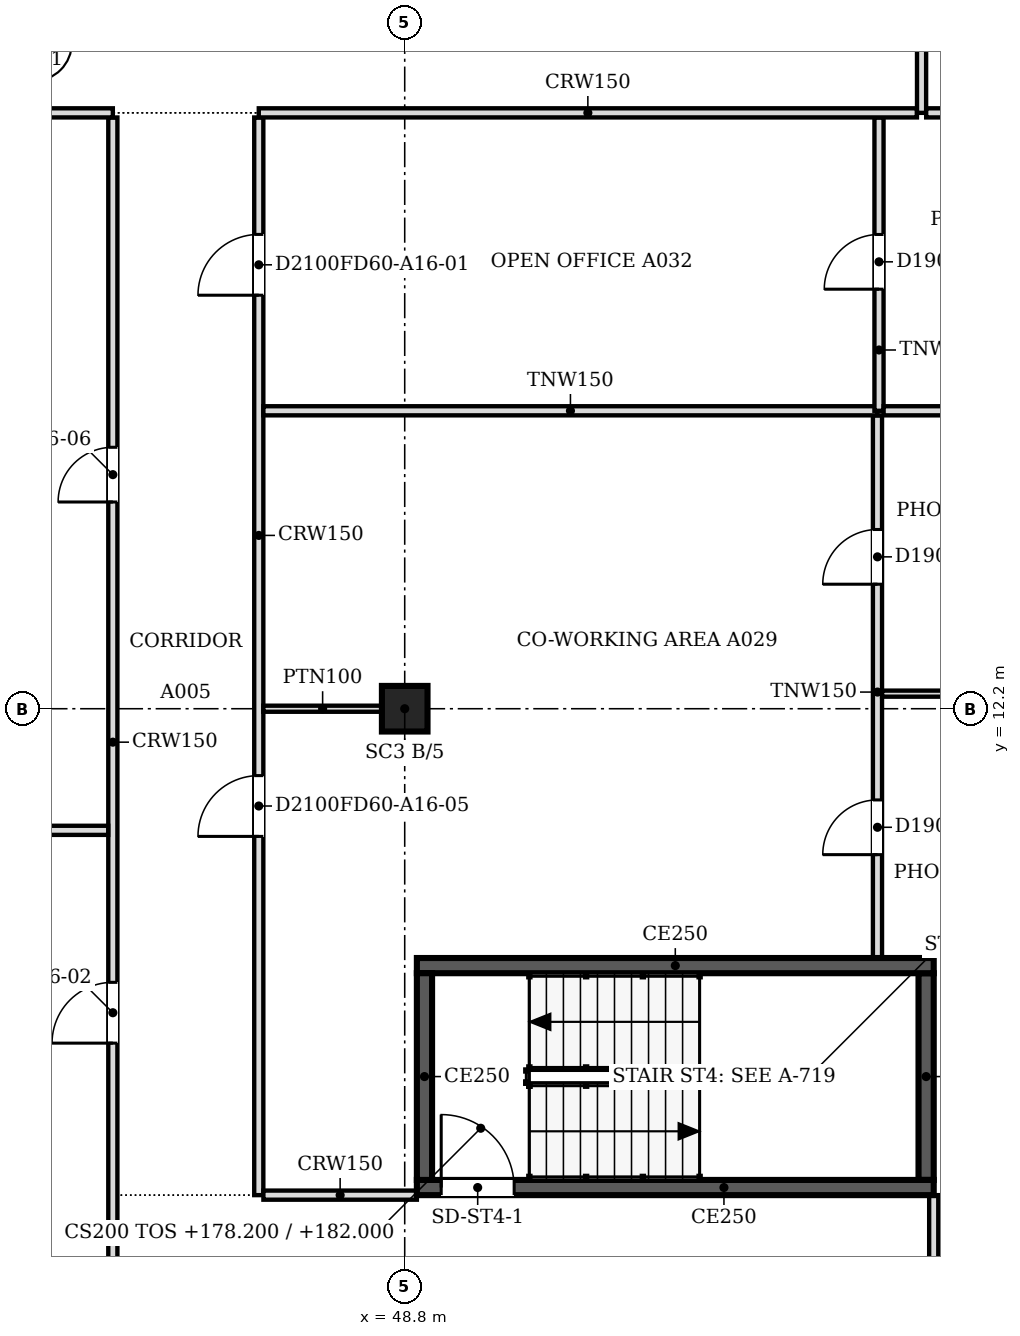
"""IFC4 building model, lengths in metres.
Left out: names, types, materials, properties, quantities, classifications, styles, units other than length and angle.
Written with IfcOpenShell. Run it as: python <this file> out.ifc"""

import sys

from ifc_helpers import new_model, si_unit, direction, frame, frame_2d, origin, origin_2d, place, context, subcontext, project, spatial, polyline, rectangle, outline, extrude, faceted_brep, source, transform, mapped, element, fill, save


model = new_model("IFC4")
c1 = context("Model", 3, precision=1e-05, world=origin(), true_north=direction((0.0, 1.0)))
c2 = subcontext(c1, "Body", "Model", "MODEL_VIEW")
j1 = project(units=[si_unit("LENGTHUNIT", "METRE"), si_unit("PLANEANGLEUNIT", "RADIAN")], contexts=[c1])
p1 = place(None, origin())
s1 = spatial("IfcSite", under=j1, at=p1, CompositionType="ELEMENT")
p2 = place(p1, origin())
s2 = spatial("IfcBuilding", under=s1, at=p2, CompositionType="ELEMENT")
p3 = place(p2, frame((0.0, 0.0, 178.2)))
s3 = spatial("IfcBuildingStorey", under=s2, at=p3, CompositionType="ELEMENT", Elevation=178.2)
p4 = place(p3, frame((48.8, 12.2, 0.0), z_axis=(0.0, 0.0, 1.0), x_axis=(1.0, 0.0, 0.0)))
e1 = element("IfcColumn", 1, at=p4, inside=s3, PredefinedType="COLUMN", context=c2, shape_type="SweptSolid", body=[
    extrude(rectangle(XDim=0.75, YDim=0.75, at=origin_2d()), origin(), (0.0, 0.0, 1.0), 3.6),
])
m1 = source(origin(), c2, "Body", "Brep", [
    faceted_brep([(2.944, -0.25, 0.0), (2.997, -0.25, 0.068), (2.997, -0.25, 7.532), (2.944, -0.25, 7.6), (0.0, -0.25, 3.8), (0.053, 0.25, 3.868), (2.891, 0.25, 7.532), (2.891, 0.25, 0.068), (0.053, 0.25, 3.732), (2.944, 0.0, 0.0), (2.944, 0.0, 7.6), (0.0, 0.0, 3.8)], [[[0, 1, 2, 3, 4]], [[5, 6, 7, 8]], [[1, 0, 9]], [[10, 3, 2]], [[6, 5, 11, 4, 3, 10]], [[8, 7, 9, 0, 4, 11]], [[8, 11, 5]], [[1, 9, 7, 6, 10, 2]]]),
])
p5 = place(p3, frame((57.606, 1.312, -3.8), z_axis=(0.0, 0.0, 1.0), x_axis=(0.707147509625, 0.707066050402, 0.0)))
e2 = element("IfcWall", 2, at=p5, inside=s3, PredefinedType="SOLIDWALL", context=c2, shape_type="MappedRepresentation", body=[
    mapped(m1, transform((0.0, 0.0, 0.0), scale=1.0)),
])
m2 = source(origin(), c2, "Body", "SweptSolid", [
    extrude(outline(polyline([(2.744, 6.934), (0.316, 3.8), (2.744, 0.667), (2.744, 6.934)])), frame((0.0, 0.26, 0.0), z_axis=(0.0, -1.0, 0.0), x_axis=(1.0, 0.0, 0.0)), (0.0, 0.0, 1.0), 0.52),
])
p6 = place(p5, origin())
e3 = element("IfcOpeningElement", 3, at=p6, cuts=e2, PredefinedType="OPENING", context=c2, shape_type="MappedRepresentation", body=[
    mapped(m2, transform((0.0, 0.0, 0.0), scale=1.0)),
])
p7 = place(p2, frame((0.0, 0.0, 182.0)))
s4 = spatial("IfcBuildingStorey", under=s2, at=p7, CompositionType="ELEMENT", Elevation=182.0)
m3 = source(origin(), c2, "Body", "Brep", [
    faceted_brep([(0.053, -0.25, 0.0), (2.997, -0.25, 3.8), (0.053, -0.25, 7.6), (0.0, -0.25, 7.532), (0.0, -0.25, 0.068), (0.106, 0.25, 7.532), (2.944, 0.25, 3.868), (2.944, 0.25, 3.732), (0.106, 0.25, 0.068), (2.997, 0.0, 3.8), (0.053, 0.0, 0.0), (0.053, 0.0, 7.6)], [[[0, 1, 2, 3, 4]], [[5, 6, 7, 8]], [[8, 7, 9, 1, 0, 10]], [[6, 5, 11, 2, 1, 9]], [[3, 2, 11]], [[10, 0, 4]], [[8, 10, 4, 3, 11, 5]], [[9, 7, 6]]]),
])
p8 = place(p7, frame((57.569, 1.274, -3.8), z_axis=(0.0, 0.0, 1.0), x_axis=(0.707066050402, 0.707147509625, 0.0)))
e4 = element("IfcWall", 4, at=p8, inside=s4, PredefinedType="SOLIDWALL", context=c2, shape_type="MappedRepresentation", body=[
    mapped(m3, transform((0.0, 0.0, 0.0), scale=1.0)),
])
m4 = source(origin(), c2, "Body", "SweptSolid", [
    extrude(outline(polyline([(0.253, 0.666), (2.681, 3.8), (0.253, 6.934), (0.253, 0.666)])), frame((0.0, 0.26, 0.0), z_axis=(0.0, -1.0, 0.0), x_axis=(1.0, 0.0, 0.0)), (0.0, 0.0, 1.0), 0.52),
])
p9 = place(p8, origin())
e5 = element("IfcOpeningElement", 5, at=p9, cuts=e4, PredefinedType="OPENING", context=c2, shape_type="MappedRepresentation", body=[
    mapped(m4, transform((0.0, 0.0, 0.0), scale=1.0)),
])
p10 = place(p3, frame((57.5, 4.325, 0.0), z_axis=(0.0, 0.0, 1.0), x_axis=(-1.0, 0.0, 0.0)))
e6 = element("IfcWall", 6, at=p10, inside=s3, PredefinedType="SOLIDWALL", context=c2, shape_type="SweptSolid", body=[
    extrude(rectangle(XDim=8.5, YDim=0.25, at=frame_2d((4.25, 0.0))), origin(), (0.0, 0.0, 1.0), 3.8),
])
m5 = source(origin(), c2, "Body", "SweptSolid", [
    extrude(rectangle(XDim=1.2, YDim=2.1, at=frame_2d((0.6, 1.05))), frame((0.0, 0.135, 0.0), z_axis=(0.0, -1.0, 0.0), x_axis=(1.0, 0.0, 0.0)), (0.0, 0.0, 1.0), 0.27),
])
p11 = place(p10, frame((6.9, 0.0, 0.0)))
e7 = element("IfcOpeningElement", 7, at=p11, cuts=e6, PredefinedType="OPENING", context=c2, shape_type="MappedRepresentation", body=[
    mapped(m5, transform((0.0, 0.0, 0.0), scale=1.0)),
])
p12 = place(p3, frame((49.125, 4.45, 0.0), z_axis=(0.0, 0.0, 1.0), x_axis=(0.0, 1.0, 0.0)))
e8 = element("IfcWall", 8, at=p12, inside=s3, PredefinedType="SOLIDWALL", context=c2, shape_type="SweptSolid", body=[
    extrude(rectangle(XDim=3.4, YDim=0.25, at=frame_2d((1.7, 0.0))), origin(), (0.0, 0.0, 1.0), 3.8),
])
p13 = place(p3, frame((49.0, 7.975, 0.0), z_axis=(0.0, 0.0, 1.0), x_axis=(1.0, 0.0, 0.0)))
e9 = element("IfcWall", 9, at=p13, inside=s3, PredefinedType="SOLIDWALL", context=c2, shape_type="SweptSolid", body=[
    extrude(rectangle(XDim=8.5, YDim=0.25, at=frame_2d((4.25, 0.0))), origin(), (0.0, 0.0, 1.0), 3.8),
])
p14 = place(p3, frame((57.375, 7.85, 0.0), z_axis=(0.0, 0.0, 1.0), x_axis=(0.0, -1.0, 0.0)))
e10 = element("IfcWall", 10, at=p14, inside=s3, PredefinedType="SOLIDWALL", context=c2, shape_type="SweptSolid", body=[
    extrude(rectangle(XDim=3.4, YDim=0.25, at=frame_2d((1.7, 0.0))), origin(), (0.0, 0.0, 1.0), 3.8),
])
p15 = place(p3, frame((44.0, 0.5, 0.0), z_axis=(0.0, 0.0, 1.0), x_axis=(0.0, 1.0, 0.0)))
e11 = element("IfcWall", 11, at=p15, inside=s3, PredefinedType="PARTITIONING", context=c2, shape_type="SweptSolid", body=[
    extrude(rectangle(XDim=21.424, YDim=0.15, at=frame_2d((10.712, 0.0))), origin(), (0.0, 0.0, 1.0), 3.067),
])
m6 = source(origin(), c2, "Body", "SweptSolid", [
    extrude(rectangle(XDim=1.0, YDim=2.1, at=frame_2d((0.5, 1.05))), frame((0.0, 0.085, 0.0), z_axis=(0.0, -1.0, 0.0), x_axis=(1.0, 0.0, 0.0)), (0.0, 0.0, 1.0), 0.17),
])
p16 = place(p15, frame((6.2, 0.0, 0.0)))
e12 = element("IfcOpeningElement", 12, at=p16, cuts=e11, PredefinedType="OPENING", context=c2, shape_type="MappedRepresentation", body=[
    mapped(m6, transform((0.0, 0.0, 0.0), scale=1.0)),
])
m7 = source(origin(), c2, "Body", "SweptSolid", [
    extrude(rectangle(XDim=0.9, YDim=2.1, at=frame_2d((0.45, 1.05))), frame((0.0, 0.085, 0.0), z_axis=(0.0, -1.0, 0.0), x_axis=(1.0, 0.0, 0.0)), (0.0, 0.0, 1.0), 0.17),
])
p17 = place(p15, frame((15.1, 0.0, 0.0)))
e13 = element("IfcOpeningElement", 13, at=p17, cuts=e11, PredefinedType="OPENING", context=c2, shape_type="MappedRepresentation", body=[
    mapped(m7, transform((0.0, 0.0, 0.0), scale=1.0)),
])
p18 = place(p3, frame((57.5, 1.559, 0.0), z_axis=(0.0, 0.0, 1.0), x_axis=(0.0, 1.0, 0.0)))
e14 = element("IfcWall", 14, at=p18, inside=s3, PredefinedType="PARTITIONING", context=c2, shape_type="SweptSolid", body=[
    extrude(rectangle(XDim=2.641, YDim=0.15, at=frame_2d((1.32, 0.0))), origin(), (0.0, 0.0, 1.0), 3.067),
])
p19 = place(p3, frame((46.4, 21.924, 0.0), z_axis=(0.0, 0.0, 1.0), x_axis=(0.0, -1.0, 0.0)))
e15 = element("IfcWall", 15, at=p19, inside=s3, PredefinedType="PARTITIONING", context=c2, shape_type="SweptSolid", body=[
    extrude(rectangle(XDim=17.724, YDim=0.15, at=frame_2d((8.862, 0.0))), origin(), (0.0, 0.0, 1.0), 3.067),
])
p20 = place(p19, frame((1.923, 0.0, 0.0)))
e16 = element("IfcOpeningElement", 16, at=p20, cuts=e15, PredefinedType="OPENING", context=c2, shape_type="MappedRepresentation", body=[
    mapped(m6, transform((0.0, 0.0, 0.0), scale=1.0)),
])
p21 = place(p19, frame((10.824, 0.0, 0.0)))
e17 = element("IfcOpeningElement", 17, at=p21, cuts=e15, PredefinedType="OPENING", context=c2, shape_type="MappedRepresentation", body=[
    mapped(m6, transform((0.0, 0.0, 0.0), scale=1.0)),
])
p22 = place(p3, frame((46.476, 4.2, 0.0), z_axis=(0.0, 0.0, 1.0), x_axis=(1.0, 0.0, 0.0)))
e18 = element("IfcWall", 18, at=p22, inside=s3, PredefinedType="PARTITIONING", context=c2, shape_type="SweptSolid", body=[
    extrude(rectangle(XDim=2.524, YDim=0.15, at=frame_2d((1.262, 0.0))), origin(), (0.0, 0.0, 1.0), 3.067),
])
p23 = place(p3, frame((56.575, 17.024, 0.0), z_axis=(0.0, 0.0, 1.0), x_axis=(0.0, -1.0, 0.0)))
e19 = element("IfcWall", 19, at=p23, inside=s3, PredefinedType="PARTITIONING", context=c2, shape_type="SweptSolid", body=[
    extrude(rectangle(XDim=8.924, YDim=0.15, at=frame_2d((4.462, 0.0))), origin(), (0.0, 0.0, 1.0), 3.067),
])
p24 = place(p23, frame((6.324, 0.0, 0.0)))
e20 = element("IfcOpeningElement", 20, at=p24, cuts=e19, PredefinedType="OPENING", context=c2, shape_type="MappedRepresentation", body=[
    mapped(m7, transform((0.0, 0.0, 0.0), scale=1.0)),
])
p25 = place(p23, frame((1.876, 0.0, 0.0)))
e21 = element("IfcOpeningElement", 21, at=p25, cuts=e19, PredefinedType="OPENING", context=c2, shape_type="MappedRepresentation", body=[
    mapped(m7, transform((0.0, 0.0, 0.0), scale=1.0)),
])
p26 = place(p3, frame((24.9, 10.2, 0.0), z_axis=(0.0, 0.0, 1.0), x_axis=(1.0, 0.0, 0.0)))
e22 = element("IfcWall", 22, at=p26, inside=s3, PredefinedType="PARTITIONING", context=c2, shape_type="SweptSolid", body=[
    extrude(rectangle(XDim=19.024, YDim=0.15, at=frame_2d((9.512, 0.0))), origin(), (0.0, 0.0, 1.0), 3.067),
])
p27 = place(p3, frame((48.425, 12.2, 0.0), z_axis=(0.0, 0.0, 1.0), x_axis=(-1.0, 0.0, 0.0)))
e23 = element("IfcWall", 23, at=p27, inside=s3, PredefinedType="PARTITIONING", context=c2, shape_type="SweptSolid", body=[
    extrude(rectangle(XDim=1.95, YDim=0.1, at=frame_2d((0.975, 0.0))), origin(), (0.0, 0.0, 1.0), 3.067),
])
p28 = place(p3, frame((56.651, 12.448, 0.0), z_axis=(0.0, 0.0, 1.0), x_axis=(1.0, 0.0, 0.0)))
e24 = element("IfcWall", 24, at=p28, inside=s3, PredefinedType="PARTITIONING", context=c2, shape_type="SweptSolid", body=[
    extrude(rectangle(XDim=3.849, YDim=0.1, at=frame_2d((1.925, 0.0))), origin(), (0.0, 0.0, 1.0), 3.067),
])
p29 = place(p3, frame((46.476, 17.1, 0.0), z_axis=(0.0, 0.0, 1.0), x_axis=(1.0, 0.0, 0.0)))
e25 = element("IfcWall", 25, at=p29, inside=s3, PredefinedType="PARTITIONING", context=c2, shape_type="SweptSolid", body=[
    extrude(rectangle(XDim=10.099, YDim=0.15, at=frame_2d((5.049, 0.0))), origin(), (0.0, 0.0, 1.0), 3.067),
])
p30 = place(p3, frame((56.6, 21.924, 0.0), z_axis=(0.0, 0.0, 1.0), x_axis=(0.0, -1.0, 0.0)))
e26 = element("IfcWall", 26, at=p30, inside=s3, PredefinedType="PARTITIONING", context=c2, shape_type="SweptSolid", body=[
    extrude(rectangle(XDim=4.824, YDim=0.15, at=frame_2d((2.412, 0.0))), origin(), (0.0, 0.0, 1.0), 3.067),
])
p31 = place(p30, frame((1.924, 0.0, 0.0)))
e27 = element("IfcOpeningElement", 27, at=p31, cuts=e26, PredefinedType="OPENING", context=c2, shape_type="MappedRepresentation", body=[
    mapped(m7, transform((0.0, 0.0, 0.0), scale=1.0)),
])
p32 = place(p3, frame((56.676, 17.1, 0.0), z_axis=(0.0, 0.0, 1.0), x_axis=(1.0, 0.0, 0.0)))
e28 = element("IfcWall", 28, at=p32, inside=s3, PredefinedType="PARTITIONING", context=c2, shape_type="SweptSolid", body=[
    extrude(rectangle(XDim=3.824, YDim=0.15, at=frame_2d((1.912, 0.0))), origin(), (0.0, 0.0, 1.0), 3.067),
])
p33 = place(p3, frame((30.5, 22.0, 0.0), z_axis=(0.0, 0.0, 1.0), x_axis=(1.0, 0.0, 0.0)))
e29 = element("IfcWall", 29, at=p33, inside=s3, PredefinedType="PARTITIONING", context=c2, shape_type="SweptSolid", body=[
    extrude(rectangle(XDim=13.5, YDim=0.15, at=frame_2d((6.75, 0.0))), origin(), (0.0, 0.0, 1.0), 3.067),
])
p34 = place(p3, frame((46.4, 22.0, 0.0), z_axis=(0.0, 0.0, 1.0), x_axis=(1.0, 0.0, 0.0)))
e30 = element("IfcWall", 30, at=p34, inside=s3, PredefinedType="PARTITIONING", context=c2, shape_type="SweptSolid", body=[
    extrude(rectangle(XDim=10.824, YDim=0.15, at=frame_2d((5.412, 0.0))), origin(), (0.0, 0.0, 1.0), 3.067),
])
p35 = place(p3, frame((57.3, 30.6, 0.0), z_axis=(0.0, 0.0, 1.0), x_axis=(0.0, -1.0, 0.0)))
e31 = element("IfcWall", 31, at=p35, inside=s3, PredefinedType="PARTITIONING", context=c2, shape_type="SweptSolid", body=[
    extrude(rectangle(XDim=8.6, YDim=0.15, at=frame_2d((4.3, 0.0))), origin(), (0.0, 0.0, 1.0), 3.067),
])
p36 = place(p35, frame((3.9, 0.0, 0.0)))
e32 = element("IfcOpeningElement", 32, at=p36, cuts=e31, PredefinedType="OPENING", context=c2, shape_type="MappedRepresentation", body=[
    mapped(m7, transform((0.0, 0.0, 0.0), scale=1.0)),
])
p37 = place(p3, frame((57.376, 22.0, 0.0), z_axis=(0.0, 0.0, 1.0), x_axis=(1.0, 0.0, 0.0)))
e33 = element("IfcWall", 33, at=p37, inside=s3, PredefinedType="PARTITIONING", context=c2, shape_type="SweptSolid", body=[
    extrude(rectangle(XDim=3.124, YDim=0.15, at=frame_2d((1.562, 0.0))), origin(), (0.0, 0.0, 1.0), 3.067),
])
m8 = source(origin(), c2, "Body", "SweptSolid", [
    extrude(rectangle(XDim=1.2, YDim=2.1, at=frame_2d((0.6, 1.05))), frame((0.0, 0.025, 0.0), z_axis=(0.0, -1.0, 0.0), x_axis=(1.0, 0.0, 0.0)), (0.0, 0.0, 1.0), 0.05),
])
p38 = place(p11, origin())
e34 = element("IfcDoor", 34, at=p38, inside=s3, OperationType="SINGLE_SWING_RIGHT", PredefinedType="DOOR", context=c2, shape_type="MappedRepresentation", body=[
    mapped(m8, transform((0.0, 0.0, 0.0), scale=1.0)),
])
fill(e7, e34)
m9 = source(origin(), c2, "Body", "SweptSolid", [
    extrude(rectangle(XDim=0.9, YDim=2.1, at=frame_2d((0.45, 1.05))), frame((0.0, 0.025, 0.0), z_axis=(0.0, -1.0, 0.0), x_axis=(1.0, 0.0, 0.0)), (0.0, 0.0, 1.0), 0.05),
])
p39 = place(p24, origin())
e35 = element("IfcDoor", 35, at=p39, inside=s3, OperationType="SINGLE_SWING_RIGHT", PredefinedType="DOOR", context=c2, shape_type="MappedRepresentation", body=[
    mapped(m9, transform((0.0, 0.0, 0.0), scale=1.0)),
])
fill(e20, e35)
p40 = place(p25, origin())
e36 = element("IfcDoor", 36, at=p40, inside=s3, OperationType="SINGLE_SWING_RIGHT", PredefinedType="DOOR", context=c2, shape_type="MappedRepresentation", body=[
    mapped(m9, transform((0.0, 0.0, 0.0), scale=1.0)),
])
fill(e21, e36)
m10 = source(origin(), c2, "Body", "SweptSolid", [
    extrude(rectangle(XDim=1.0, YDim=2.1, at=frame_2d((0.5, 1.05))), frame((0.0, 0.025, 0.0), z_axis=(0.0, -1.0, 0.0), x_axis=(1.0, 0.0, 0.0)), (0.0, 0.0, 1.0), 0.05),
])
p41 = place(p20, origin())
e37 = element("IfcDoor", 37, at=p41, inside=s3, OperationType="SINGLE_SWING_RIGHT", PredefinedType="DOOR", context=c2, shape_type="MappedRepresentation", body=[
    mapped(m10, transform((0.0, 0.0, 0.0), scale=1.0)),
])
fill(e16, e37)
p42 = place(p31, origin())
e38 = element("IfcDoor", 38, at=p42, inside=s3, OperationType="SINGLE_SWING_RIGHT", PredefinedType="DOOR", context=c2, shape_type="MappedRepresentation", body=[
    mapped(m9, transform((0.0, 0.0, 0.0), scale=1.0)),
])
fill(e27, e38)
p43 = place(p16, origin())
e39 = element("IfcDoor", 39, at=p43, inside=s3, OperationType="SINGLE_SWING_LEFT", PredefinedType="DOOR", context=c2, shape_type="MappedRepresentation", body=[
    mapped(m10, transform((0.0, 0.0, 0.0), scale=1.0)),
])
fill(e12, e39)
p44 = place(p17, origin())
e40 = element("IfcDoor", 40, at=p44, inside=s3, OperationType="SINGLE_SWING_LEFT", PredefinedType="DOOR", context=c2, shape_type="MappedRepresentation", body=[
    mapped(m9, transform((0.0, 0.0, 0.0), scale=1.0)),
])
fill(e13, e40)
p45 = place(p21, origin())
e41 = element("IfcDoor", 41, at=p45, inside=s3, OperationType="SINGLE_SWING_RIGHT", PredefinedType="DOOR", context=c2, shape_type="MappedRepresentation", body=[
    mapped(m10, transform((0.0, 0.0, 0.0), scale=1.0)),
])
fill(e17, e41)
save(model, sys.argv[1])
